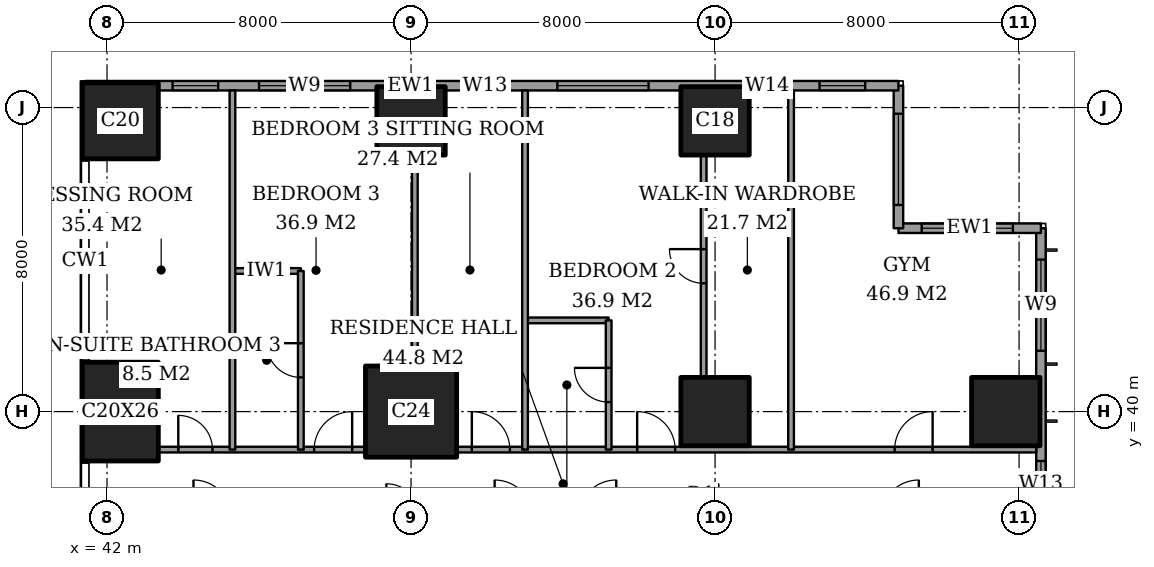
"""IFC4 building model, lengths in metres.
Left out: names, types, materials, properties, quantities, classifications, styles, units other than length and angle.
Written with IfcOpenShell. Run it as: python <this file> out.ifc"""

import sys

from ifc_helpers import new_model, si_unit, direction, frame, frame_2d, origin, origin_2d, place, context, subcontext, project, spatial, rectangle, extrude, element, fill, save


model = new_model("IFC4")
c1 = context("Model", 3, precision=1e-05, world=origin(), true_north=direction((0.0, 1.0)))
c2 = subcontext(c1, "Body", "Model", "MODEL_VIEW")
j1 = project(units=[si_unit("LENGTHUNIT", "METRE"), si_unit("PLANEANGLEUNIT", "RADIAN")], contexts=[c1])
p1 = place(None, origin())
s1 = spatial("IfcSite", under=j1, at=p1, CompositionType="ELEMENT")
p2 = place(p1, origin())
s2 = spatial("IfcBuilding", under=s1, at=p2, CompositionType="ELEMENT")
p3 = place(p2, frame((0.0, 0.0, 203.8)))
s3 = spatial("IfcBuildingStorey", under=s2, at=p3, CompositionType="ELEMENT", Elevation=203.8)
p4 = place(p3, frame((42.35, 40.0, 0.0), z_axis=(0.0, 0.0, 1.0), x_axis=(1.0, 0.0, 0.0)))
e1 = element("IfcColumn", 1, at=p4, inside=s3, PredefinedType="COLUMN", context=c2, shape_type="SweptSolid", body=[
    extrude(rectangle(XDim=2.0, YDim=2.6, at=origin_2d()), origin(), (0.0, 0.0, 1.0), 3.6),
])
p5 = place(p3, frame((42.35, 47.65, 0.0), z_axis=(0.0, 0.0, 1.0), x_axis=(1.0, 0.0, 0.0)))
e2 = element("IfcColumn", 2, at=p5, inside=s3, PredefinedType="COLUMN", context=c2, shape_type="SweptSolid", body=[
    extrude(rectangle(XDim=2.0, YDim=2.0, at=origin_2d()), origin(), (0.0, 0.0, 1.0), 3.6),
])
p6 = place(p3, frame((50.0, 40.0, 0.0), z_axis=(0.0, 0.0, 1.0), x_axis=(1.0, 0.0, 0.0)))
e3 = element("IfcColumn", 3, at=p6, inside=s3, PredefinedType="COLUMN", context=c2, shape_type="SweptSolid", body=[
    extrude(rectangle(XDim=2.4, YDim=2.4, at=origin_2d()), origin(), (0.0, 0.0, 1.0), 3.6),
])
for number, where, z_axis, x_axis in (
    (4, (50.0, 47.65, 0.0), (0.0, 0.0, 1.0), (1.0, 0.0, 0.0)),
    (5, (58.0, 40.0, 0.0), (0.0, 0.0, 1.0), (1.0, 0.0, 0.0)),
    (6, (58.0, 47.65, 0.0), (0.0, 0.0, 1.0), (1.0, 0.0, 0.0)),
    (7, (65.65, 40.0, 0.0), (0.0, 0.0, 1.0), (1.0, 0.0, 0.0)),
):
    element("IfcColumn", number, at=place(p3, frame(where, z_axis=z_axis, x_axis=x_axis)), inside=s3, PredefinedType="COLUMN", context=c2, shape_type="SweptSolid", body=[
        extrude(rectangle(XDim=1.8, YDim=1.8, at=origin_2d()), origin(), (0.0, 0.0, 1.0), 3.6),
    ])
p7 = place(p3, frame((66.575, 3.175, 0.0), z_axis=(0.0, 0.0, 1.0), x_axis=(0.0, 1.0, 0.0)))
e8 = element("IfcWall", 8, at=p7, inside=s3, PredefinedType="SOLIDWALL", context=c2, shape_type="SweptSolid", body=[
    extrude(rectangle(XDim=41.65, YDim=0.25, at=frame_2d((20.825, 0.0))), origin(), (0.0, 0.0, 1.0), 3.6),
])
p8 = place(p7, frame((0.825, 0.0, 0.2)))
e9 = element("IfcOpeningElement", 9, at=p8, cuts=e8, PredefinedType="OPENING", context=c2, shape_type="SweptSolid", body=[
    extrude(rectangle(XDim=2.4, YDim=2.4, at=frame_2d((1.2, 1.2))), frame((0.0, 0.135, 0.0), z_axis=(0.0, -1.0, 0.0), x_axis=(1.0, 0.0, 0.0)), (0.0, 0.0, 1.0), 0.27),
])
p9 = place(p7, frame((6.6, 0.0, 0.2)))
e10 = element("IfcOpeningElement", 10, at=p9, cuts=e8, PredefinedType="OPENING", context=c2, shape_type="SweptSolid", body=[
    extrude(rectangle(XDim=1.2, YDim=2.4, at=frame_2d((0.6, 1.2))), frame((0.0, 0.135, 0.0), z_axis=(0.0, -1.0, 0.0), x_axis=(1.0, 0.0, 0.0)), (0.0, 0.0, 1.0), 0.27),
])
p10 = place(p7, frame((8.775, 0.0, 0.2)))
e11 = element("IfcOpeningElement", 11, at=p10, cuts=e8, PredefinedType="OPENING", context=c2, shape_type="SweptSolid", body=[
    extrude(rectangle(XDim=2.4, YDim=2.4, at=frame_2d((1.2, 1.2))), frame((0.0, 0.135, 0.0), z_axis=(0.0, -1.0, 0.0), x_axis=(1.0, 0.0, 0.0)), (0.0, 0.0, 1.0), 0.27),
])
p11 = place(p7, frame((15.675, 0.0, 0.2)))
e12 = element("IfcOpeningElement", 12, at=p11, cuts=e8, PredefinedType="OPENING", context=c2, shape_type="SweptSolid", body=[
    extrude(rectangle(XDim=2.4, YDim=2.4, at=frame_2d((1.2, 1.2))), frame((0.0, 0.135, 0.0), z_axis=(0.0, -1.0, 0.0), x_axis=(1.0, 0.0, 0.0)), (0.0, 0.0, 1.0), 0.27),
])
p12 = place(p7, frame((23.575, 0.0, 0.2)))
e13 = element("IfcOpeningElement", 13, at=p12, cuts=e8, PredefinedType="OPENING", context=c2, shape_type="SweptSolid", body=[
    extrude(rectangle(XDim=2.4, YDim=2.4, at=frame_2d((1.2, 1.2))), frame((0.0, 0.135, 0.0), z_axis=(0.0, -1.0, 0.0), x_axis=(1.0, 0.0, 0.0)), (0.0, 0.0, 1.0), 0.27),
])
p13 = place(p7, frame((30.675, 0.0, 0.2)))
e14 = element("IfcOpeningElement", 14, at=p13, cuts=e8, PredefinedType="OPENING", context=c2, shape_type="SweptSolid", body=[
    extrude(rectangle(XDim=2.4, YDim=2.4, at=frame_2d((1.2, 1.2))), frame((0.0, 0.135, 0.0), z_axis=(0.0, -1.0, 0.0), x_axis=(1.0, 0.0, 0.0)), (0.0, 0.0, 1.0), 0.27),
])
p14 = place(p7, frame((34.325, 0.0, 0.2)))
e15 = element("IfcOpeningElement", 15, at=p14, cuts=e8, PredefinedType="OPENING", context=c2, shape_type="SweptSolid", body=[
    extrude(rectangle(XDim=1.2, YDim=2.4, at=frame_2d((0.6, 1.2))), frame((0.0, 0.135, 0.0), z_axis=(0.0, -1.0, 0.0), x_axis=(1.0, 0.0, 0.0)), (0.0, 0.0, 1.0), 0.27),
])
p15 = place(p7, frame((38.425, 0.0, 0.2)))
e16 = element("IfcOpeningElement", 16, at=p15, cuts=e8, PredefinedType="OPENING", context=c2, shape_type="SweptSolid", body=[
    extrude(rectangle(XDim=2.4, YDim=2.4, at=frame_2d((1.2, 1.2))), frame((0.0, 0.135, 0.0), z_axis=(0.0, -1.0, 0.0), x_axis=(1.0, 0.0, 0.0)), (0.0, 0.0, 1.0), 0.27),
])
p16 = place(p3, frame((66.575, 44.825, 0.0), z_axis=(0.0, 0.0, 1.0), x_axis=(-1.0, 0.0, 0.0)))
e17 = element("IfcWall", 17, at=p16, inside=s3, PredefinedType="SOLIDWALL", context=c2, shape_type="SweptSolid", body=[
    extrude(rectangle(XDim=3.75, YDim=0.25, at=frame_2d((1.875, 0.0))), origin(), (0.0, 0.0, 1.0), 3.6),
])
p17 = place(p16, frame((0.738, 0.0, 0.2)))
e18 = element("IfcOpeningElement", 18, at=p17, cuts=e17, PredefinedType="OPENING", context=c2, shape_type="SweptSolid", body=[
    extrude(rectangle(XDim=2.4, YDim=2.4, at=frame_2d((1.2, 1.2))), frame((0.0, 0.135, 0.0), z_axis=(0.0, -1.0, 0.0), x_axis=(1.0, 0.0, 0.0)), (0.0, 0.0, 1.0), 0.27),
])
p18 = place(p3, frame((62.825, 44.825, 0.0), z_axis=(0.0, 0.0, 1.0), x_axis=(0.0, 1.0, 0.0)))
e19 = element("IfcWall", 19, at=p18, inside=s3, PredefinedType="SOLIDWALL", context=c2, shape_type="SweptSolid", body=[
    extrude(rectangle(XDim=3.75, YDim=0.25, at=frame_2d((1.875, 0.0))), origin(), (0.0, 0.0, 1.0), 3.6),
])
p19 = place(p18, frame((0.613, 0.0, 0.2)))
e20 = element("IfcOpeningElement", 20, at=p19, cuts=e19, PredefinedType="OPENING", context=c2, shape_type="SweptSolid", body=[
    extrude(rectangle(XDim=2.4, YDim=2.4, at=frame_2d((1.2, 1.2))), frame((0.0, 0.135, 0.0), z_axis=(0.0, -1.0, 0.0), x_axis=(1.0, 0.0, 0.0)), (0.0, 0.0, 1.0), 0.27),
])
p20 = place(p3, frame((62.825, 48.575, 0.0), z_axis=(0.0, 0.0, 1.0), x_axis=(-1.0, 0.0, 0.0)))
e21 = element("IfcWall", 21, at=p20, inside=s3, PredefinedType="SOLIDWALL", context=c2, shape_type="SweptSolid", body=[
    extrude(rectangle(XDim=21.4, YDim=0.25, at=frame_2d((10.7, 0.0))), origin(), (0.0, 0.0, 1.0), 3.6),
])
p21 = place(p20, frame((0.875, 0.0, 0.2)))
e22 = element("IfcOpeningElement", 22, at=p21, cuts=e21, PredefinedType="OPENING", context=c2, shape_type="SweptSolid", body=[
    extrude(rectangle(XDim=1.2, YDim=2.4, at=frame_2d((0.6, 1.2))), frame((0.0, 0.135, 0.0), z_axis=(0.0, -1.0, 0.0), x_axis=(1.0, 0.0, 0.0)), (0.0, 0.0, 1.0), 0.27),
])
p22 = place(p20, frame((3.15, 0.0, 0.2)))
e23 = element("IfcOpeningElement", 23, at=p22, cuts=e21, PredefinedType="OPENING", context=c2, shape_type="SweptSolid", body=[
    extrude(rectangle(XDim=0.6, YDim=2.4, at=frame_2d((0.3, 1.2))), frame((0.0, 0.135, 0.0), z_axis=(0.0, -1.0, 0.0), x_axis=(1.0, 0.0, 0.0)), (0.0, 0.0, 1.0), 0.27),
])
p23 = place(p20, frame((6.575, 0.0, 0.2)))
e24 = element("IfcOpeningElement", 24, at=p23, cuts=e21, PredefinedType="OPENING", context=c2, shape_type="SweptSolid", body=[
    extrude(rectangle(XDim=2.4, YDim=2.4, at=frame_2d((1.2, 1.2))), frame((0.0, 0.135, 0.0), z_axis=(0.0, -1.0, 0.0), x_axis=(1.0, 0.0, 0.0)), (0.0, 0.0, 1.0), 0.27),
])
p24 = place(p20, frame((10.275, 0.0, 0.2)))
e25 = element("IfcOpeningElement", 25, at=p24, cuts=e21, PredefinedType="OPENING", context=c2, shape_type="SweptSolid", body=[
    extrude(rectangle(XDim=1.2, YDim=2.4, at=frame_2d((0.6, 1.2))), frame((0.0, 0.135, 0.0), z_axis=(0.0, -1.0, 0.0), x_axis=(1.0, 0.0, 0.0)), (0.0, 0.0, 1.0), 0.27),
])
p25 = place(p20, frame((14.425, 0.0, 0.2)))
e26 = element("IfcOpeningElement", 26, at=p25, cuts=e21, PredefinedType="OPENING", context=c2, shape_type="SweptSolid", body=[
    extrude(rectangle(XDim=2.4, YDim=2.4, at=frame_2d((1.2, 1.2))), frame((0.0, 0.135, 0.0), z_axis=(0.0, -1.0, 0.0), x_axis=(1.0, 0.0, 0.0)), (0.0, 0.0, 1.0), 0.27),
])
p26 = place(p20, frame((17.9, 0.0, 0.2)))
e27 = element("IfcOpeningElement", 27, at=p26, cuts=e21, PredefinedType="OPENING", context=c2, shape_type="SweptSolid", body=[
    extrude(rectangle(XDim=1.2, YDim=2.4, at=frame_2d((0.6, 1.2))), frame((0.0, 0.135, 0.0), z_axis=(0.0, -1.0, 0.0), x_axis=(1.0, 0.0, 0.0)), (0.0, 0.0, 1.0), 0.27),
])
p27 = place(p3, frame((43.35, 39.0, 0.0), z_axis=(0.0, 0.0, 1.0), x_axis=(1.0, 0.0, 0.0)))
e28 = element("IfcWall", 28, at=p27, inside=s3, PredefinedType="PARTITIONING", context=c2, shape_type="SweptSolid", body=[
    extrude(rectangle(XDim=5.45, YDim=0.15, at=frame_2d((2.725, 0.0))), origin(), (0.0, 0.0, 1.0), 3.35),
])
p28 = place(p27, frame((4.1, 0.0, 0.0)))
e29 = element("IfcOpeningElement", 29, at=p28, cuts=e28, PredefinedType="OPENING", context=c2, shape_type="SweptSolid", body=[
    extrude(rectangle(XDim=1.0, YDim=2.1, at=frame_2d((0.5, 1.05))), frame((0.0, 0.085, 0.0), z_axis=(0.0, -1.0, 0.0), x_axis=(1.0, 0.0, 0.0)), (0.0, 0.0, 1.0), 0.17),
])
p29 = place(p27, frame((0.525, 0.0, 0.0)))
e30 = element("IfcOpeningElement", 30, at=p29, cuts=e28, PredefinedType="OPENING", context=c2, shape_type="SweptSolid", body=[
    extrude(rectangle(XDim=0.9, YDim=2.1, at=frame_2d((0.45, 1.05))), frame((0.0, 0.085, 0.0), z_axis=(0.0, -1.0, 0.0), x_axis=(1.0, 0.0, 0.0)), (0.0, 0.0, 1.0), 0.17),
])
p30 = place(p3, frame((51.2, 39.0, 0.0), z_axis=(0.0, 0.0, 1.0), x_axis=(1.0, 0.0, 0.0)))
e31 = element("IfcWall", 31, at=p30, inside=s3, PredefinedType="PARTITIONING", context=c2, shape_type="SweptSolid", body=[
    extrude(rectangle(XDim=15.25, YDim=0.15, at=frame_2d((7.625, 0.0))), origin(), (0.0, 0.0, 1.0), 3.35),
])
p31 = place(p30, frame((11.525, 0.0, 0.0)))
e32 = element("IfcOpeningElement", 32, at=p31, cuts=e31, PredefinedType="OPENING", context=c2, shape_type="SweptSolid", body=[
    extrude(rectangle(XDim=1.0, YDim=2.1, at=frame_2d((0.5, 1.05))), frame((0.0, 0.085, 0.0), z_axis=(0.0, -1.0, 0.0), x_axis=(1.0, 0.0, 0.0)), (0.0, 0.0, 1.0), 0.17),
])
p32 = place(p30, frame((4.75, 0.0, 0.0)))
e33 = element("IfcOpeningElement", 33, at=p32, cuts=e31, PredefinedType="OPENING", context=c2, shape_type="SweptSolid", body=[
    extrude(rectangle(XDim=1.0, YDim=2.1, at=frame_2d((0.5, 1.05))), frame((0.0, 0.085, 0.0), z_axis=(0.0, -1.0, 0.0), x_axis=(1.0, 0.0, 0.0)), (0.0, 0.0, 1.0), 0.17),
])
p33 = place(p30, frame((0.4, 0.0, 0.0)))
e34 = element("IfcOpeningElement", 34, at=p33, cuts=e31, PredefinedType="OPENING", context=c2, shape_type="SweptSolid", body=[
    extrude(rectangle(XDim=1.0, YDim=2.1, at=frame_2d((0.5, 1.05))), frame((0.0, 0.085, 0.0), z_axis=(0.0, -1.0, 0.0), x_axis=(1.0, 0.0, 0.0)), (0.0, 0.0, 1.0), 0.17),
])
p34 = place(p3, frame((53.0, 42.4, 0.0), z_axis=(0.0, 0.0, 1.0), x_axis=(1.0, 0.0, 0.0)))
e35 = element("IfcWall", 35, at=p34, inside=s3, PredefinedType="PARTITIONING", context=c2, shape_type="SweptSolid", body=[
    extrude(rectangle(XDim=2.2, YDim=0.15, at=frame_2d((1.1, 0.0))), origin(), (0.0, 0.0, 1.0), 3.35),
])
p35 = place(p3, frame((45.3, 43.7, 0.0), z_axis=(0.0, 0.0, 1.0), x_axis=(1.0, 0.0, 0.0)))
e36 = element("IfcWall", 36, at=p35, inside=s3, PredefinedType="PARTITIONING", context=c2, shape_type="SweptSolid", body=[
    extrude(rectangle(XDim=1.8, YDim=0.15, at=frame_2d((0.9, 0.0))), origin(), (0.0, 0.0, 1.0), 3.35),
])
p36 = place(p3, frame((45.3, 39.0, 0.0), z_axis=(0.0, 0.0, 1.0), x_axis=(0.0, 1.0, 0.0)))
e37 = element("IfcWall", 37, at=p36, inside=s3, PredefinedType="PARTITIONING", context=c2, shape_type="SweptSolid", body=[
    extrude(rectangle(XDim=9.45, YDim=0.15, at=frame_2d((4.725, 0.0))), origin(), (0.0, 0.0, 1.0), 3.35),
])
p37 = place(p3, frame((47.1, 39.0, 0.0), z_axis=(0.0, 0.0, 1.0), x_axis=(0.0, 1.0, 0.0)))
e38 = element("IfcWall", 38, at=p37, inside=s3, PredefinedType="PARTITIONING", context=c2, shape_type="SweptSolid", body=[
    extrude(rectangle(XDim=4.7, YDim=0.15, at=frame_2d((2.35, 0.0))), origin(), (0.0, 0.0, 1.0), 3.35),
])
p38 = place(p37, frame((1.9, 0.0, 0.0)))
e39 = element("IfcOpeningElement", 39, at=p38, cuts=e38, PredefinedType="OPENING", context=c2, shape_type="SweptSolid", body=[
    extrude(rectangle(XDim=0.9, YDim=2.1, at=frame_2d((0.45, 1.05))), frame((0.0, 0.085, 0.0), z_axis=(0.0, -1.0, 0.0), x_axis=(1.0, 0.0, 0.0)), (0.0, 0.0, 1.0), 0.17),
])
p39 = place(p3, frame((50.1, 41.2, 0.0), z_axis=(0.0, 0.0, 1.0), x_axis=(0.0, 1.0, 0.0)))
e40 = element("IfcWall", 40, at=p39, inside=s3, PredefinedType="PARTITIONING", context=c2, shape_type="SweptSolid", body=[
    extrude(rectangle(XDim=5.55, YDim=0.15, at=frame_2d((2.775, 0.0))), origin(), (0.0, 0.0, 1.0), 3.35),
])
p40 = place(p3, frame((53.0, 39.0, 0.0), z_axis=(0.0, 0.0, 1.0), x_axis=(0.0, 1.0, 0.0)))
e41 = element("IfcWall", 41, at=p40, inside=s3, PredefinedType="PARTITIONING", context=c2, shape_type="SweptSolid", body=[
    extrude(rectangle(XDim=9.45, YDim=0.15, at=frame_2d((4.725, 0.0))), origin(), (0.0, 0.0, 1.0), 3.35),
])
p41 = place(p3, frame((55.2, 39.0, 0.0), z_axis=(0.0, 0.0, 1.0), x_axis=(0.0, 1.0, 0.0)))
e42 = element("IfcWall", 42, at=p41, inside=s3, PredefinedType="PARTITIONING", context=c2, shape_type="SweptSolid", body=[
    extrude(rectangle(XDim=3.4, YDim=0.15, at=frame_2d((1.7, 0.0))), origin(), (0.0, 0.0, 1.0), 3.35),
])
p42 = place(p41, frame((1.25, 0.0, 0.0)))
e43 = element("IfcOpeningElement", 43, at=p42, cuts=e42, PredefinedType="OPENING", context=c2, shape_type="SweptSolid", body=[
    extrude(rectangle(XDim=0.9, YDim=2.1, at=frame_2d((0.45, 1.05))), frame((0.0, 0.085, 0.0), z_axis=(0.0, -1.0, 0.0), x_axis=(1.0, 0.0, 0.0)), (0.0, 0.0, 1.0), 0.17),
])
p43 = place(p3, frame((57.7, 40.9, 0.0), z_axis=(0.0, 0.0, 1.0), x_axis=(0.0, 1.0, 0.0)))
e44 = element("IfcWall", 44, at=p43, inside=s3, PredefinedType="PARTITIONING", context=c2, shape_type="SweptSolid", body=[
    extrude(rectangle(XDim=5.85, YDim=0.15, at=frame_2d((2.925, 0.0))), origin(), (0.0, 0.0, 1.0), 3.35),
])
p44 = place(p43, frame((2.475, 0.0, 0.0)))
e45 = element("IfcOpeningElement", 45, at=p44, cuts=e44, PredefinedType="OPENING", context=c2, shape_type="SweptSolid", body=[
    extrude(rectangle(XDim=0.9, YDim=2.1, at=frame_2d((0.45, 1.05))), frame((0.0, 0.085, 0.0), z_axis=(0.0, -1.0, 0.0), x_axis=(1.0, 0.0, 0.0)), (0.0, 0.0, 1.0), 0.17),
])
p45 = place(p3, frame((60.0, 39.0, 0.0), z_axis=(0.0, 0.0, 1.0), x_axis=(0.0, 1.0, 0.0)))
e46 = element("IfcWall", 46, at=p45, inside=s3, PredefinedType="PARTITIONING", context=c2, shape_type="SweptSolid", body=[
    extrude(rectangle(XDim=9.45, YDim=0.15, at=frame_2d((4.725, 0.0))), origin(), (0.0, 0.0, 1.0), 3.35),
])
p46 = place(p14, origin())
e47 = element("IfcWindow", 47, at=p46, inside=s3, PartitioningType="SINGLE_PANEL", PredefinedType="WINDOW", context=c2, shape_type="SweptSolid", body=[
    extrude(rectangle(XDim=1.2, YDim=2.4, at=frame_2d((0.6, 1.2))), frame((0.0, 0.03, 0.0), z_axis=(0.0, -1.0, 0.0), x_axis=(1.0, 0.0, 0.0)), (0.0, 0.0, 1.0), 0.06),
])
fill(e15, e47)
p47 = place(p15, origin())
e48 = element("IfcWindow", 48, at=p47, inside=s3, PartitioningType="SINGLE_PANEL", PredefinedType="WINDOW", context=c2, shape_type="SweptSolid", body=[
    extrude(rectangle(XDim=2.4, YDim=2.4, at=frame_2d((1.2, 1.2))), frame((0.0, 0.03, 0.0), z_axis=(0.0, -1.0, 0.0), x_axis=(1.0, 0.0, 0.0)), (0.0, 0.0, 1.0), 0.06),
])
fill(e16, e48)
p48 = place(p17, origin())
e49 = element("IfcWindow", 49, at=p48, inside=s3, PartitioningType="SINGLE_PANEL", PredefinedType="WINDOW", context=c2, shape_type="SweptSolid", body=[
    extrude(rectangle(XDim=2.4, YDim=2.4, at=frame_2d((1.2, 1.2))), frame((0.0, 0.03, 0.0), z_axis=(0.0, -1.0, 0.0), x_axis=(1.0, 0.0, 0.0)), (0.0, 0.0, 1.0), 0.06),
])
fill(e18, e49)
p49 = place(p19, origin())
e50 = element("IfcWindow", 50, at=p49, inside=s3, PartitioningType="SINGLE_PANEL", PredefinedType="WINDOW", context=c2, shape_type="SweptSolid", body=[
    extrude(rectangle(XDim=2.4, YDim=2.4, at=frame_2d((1.2, 1.2))), frame((0.0, 0.03, 0.0), z_axis=(0.0, -1.0, 0.0), x_axis=(1.0, 0.0, 0.0)), (0.0, 0.0, 1.0), 0.06),
])
fill(e20, e50)
p50 = place(p21, origin())
e51 = element("IfcWindow", 51, at=p50, inside=s3, PartitioningType="SINGLE_PANEL", PredefinedType="WINDOW", context=c2, shape_type="SweptSolid", body=[
    extrude(rectangle(XDim=1.2, YDim=2.4, at=frame_2d((0.6, 1.2))), frame((0.0, 0.03, 0.0), z_axis=(0.0, -1.0, 0.0), x_axis=(1.0, 0.0, 0.0)), (0.0, 0.0, 1.0), 0.06),
])
fill(e22, e51)
p51 = place(p22, origin())
e52 = element("IfcWindow", 52, at=p51, inside=s3, PartitioningType="SINGLE_PANEL", PredefinedType="WINDOW", context=c2, shape_type="SweptSolid", body=[
    extrude(rectangle(XDim=0.6, YDim=2.4, at=frame_2d((0.3, 1.2))), frame((0.0, 0.03, 0.0), z_axis=(0.0, -1.0, 0.0), x_axis=(1.0, 0.0, 0.0)), (0.0, 0.0, 1.0), 0.06),
])
fill(e23, e52)
p52 = place(p23, origin())
e53 = element("IfcWindow", 53, at=p52, inside=s3, PartitioningType="SINGLE_PANEL", PredefinedType="WINDOW", context=c2, shape_type="SweptSolid", body=[
    extrude(rectangle(XDim=2.4, YDim=2.4, at=frame_2d((1.2, 1.2))), frame((0.0, 0.03, 0.0), z_axis=(0.0, -1.0, 0.0), x_axis=(1.0, 0.0, 0.0)), (0.0, 0.0, 1.0), 0.06),
])
fill(e24, e53)
p53 = place(p24, origin())
e54 = element("IfcWindow", 54, at=p53, inside=s3, PartitioningType="SINGLE_PANEL", PredefinedType="WINDOW", context=c2, shape_type="SweptSolid", body=[
    extrude(rectangle(XDim=1.2, YDim=2.4, at=frame_2d((0.6, 1.2))), frame((0.0, 0.03, 0.0), z_axis=(0.0, -1.0, 0.0), x_axis=(1.0, 0.0, 0.0)), (0.0, 0.0, 1.0), 0.06),
])
fill(e25, e54)
p54 = place(p25, origin())
e55 = element("IfcWindow", 55, at=p54, inside=s3, PartitioningType="SINGLE_PANEL", PredefinedType="WINDOW", context=c2, shape_type="SweptSolid", body=[
    extrude(rectangle(XDim=2.4, YDim=2.4, at=frame_2d((1.2, 1.2))), frame((0.0, 0.03, 0.0), z_axis=(0.0, -1.0, 0.0), x_axis=(1.0, 0.0, 0.0)), (0.0, 0.0, 1.0), 0.06),
])
fill(e26, e55)
p55 = place(p26, origin())
e56 = element("IfcWindow", 56, at=p55, inside=s3, PartitioningType="SINGLE_PANEL", PredefinedType="WINDOW", context=c2, shape_type="SweptSolid", body=[
    extrude(rectangle(XDim=1.2, YDim=2.4, at=frame_2d((0.6, 1.2))), frame((0.0, 0.03, 0.0), z_axis=(0.0, -1.0, 0.0), x_axis=(1.0, 0.0, 0.0)), (0.0, 0.0, 1.0), 0.06),
])
fill(e27, e56)
p56 = place(p31, origin())
e57 = element("IfcDoor", 57, at=p56, inside=s3, OperationType="SINGLE_SWING_LEFT", PredefinedType="DOOR", context=c2, shape_type="SweptSolid", body=[
    extrude(rectangle(XDim=1.0, YDim=2.1, at=frame_2d((0.5, 1.05))), frame((0.0, 0.025, 0.0), z_axis=(0.0, -1.0, 0.0), x_axis=(1.0, 0.0, 0.0)), (0.0, 0.0, 1.0), 0.05),
])
fill(e32, e57)
p57 = place(p44, origin())
e58 = element("IfcDoor", 58, at=p57, inside=s3, OperationType="SINGLE_SWING_LEFT", PredefinedType="DOOR", context=c2, shape_type="SweptSolid", body=[
    extrude(rectangle(XDim=0.9, YDim=2.1, at=frame_2d((0.45, 1.05))), frame((0.0, 0.025, 0.0), z_axis=(0.0, -1.0, 0.0), x_axis=(1.0, 0.0, 0.0)), (0.0, 0.0, 1.0), 0.05),
])
fill(e45, e58)
p58 = place(p42, origin())
e59 = element("IfcDoor", 59, at=p58, inside=s3, OperationType="SINGLE_SWING_LEFT", PredefinedType="DOOR", context=c2, shape_type="SweptSolid", body=[
    extrude(rectangle(XDim=0.9, YDim=2.1, at=frame_2d((0.45, 1.05))), frame((0.0, 0.025, 0.0), z_axis=(0.0, -1.0, 0.0), x_axis=(1.0, 0.0, 0.0)), (0.0, 0.0, 1.0), 0.05),
])
fill(e43, e59)
p59 = place(p32, origin())
e60 = element("IfcDoor", 60, at=p59, inside=s3, OperationType="SINGLE_SWING_RIGHT", PredefinedType="DOOR", context=c2, shape_type="SweptSolid", body=[
    extrude(rectangle(XDim=1.0, YDim=2.1, at=frame_2d((0.5, 1.05))), frame((0.0, 0.025, 0.0), z_axis=(0.0, -1.0, 0.0), x_axis=(1.0, 0.0, 0.0)), (0.0, 0.0, 1.0), 0.05),
])
fill(e33, e60)
p60 = place(p33, origin())
e61 = element("IfcDoor", 61, at=p60, inside=s3, OperationType="SINGLE_SWING_RIGHT", PredefinedType="DOOR", context=c2, shape_type="SweptSolid", body=[
    extrude(rectangle(XDim=1.0, YDim=2.1, at=frame_2d((0.5, 1.05))), frame((0.0, 0.025, 0.0), z_axis=(0.0, -1.0, 0.0), x_axis=(1.0, 0.0, 0.0)), (0.0, 0.0, 1.0), 0.05),
])
fill(e34, e61)
p61 = place(p38, origin())
e62 = element("IfcDoor", 62, at=p61, inside=s3, OperationType="SINGLE_SWING_LEFT", PredefinedType="DOOR", context=c2, shape_type="SweptSolid", body=[
    extrude(rectangle(XDim=0.9, YDim=2.1, at=frame_2d((0.45, 1.05))), frame((0.0, 0.025, 0.0), z_axis=(0.0, -1.0, 0.0), x_axis=(1.0, 0.0, 0.0)), (0.0, 0.0, 1.0), 0.05),
])
fill(e39, e62)
p62 = place(p28, origin())
e63 = element("IfcDoor", 63, at=p62, inside=s3, OperationType="SINGLE_SWING_LEFT", PredefinedType="DOOR", context=c2, shape_type="SweptSolid", body=[
    extrude(rectangle(XDim=1.0, YDim=2.1, at=frame_2d((0.5, 1.05))), frame((0.0, 0.025, 0.0), z_axis=(0.0, -1.0, 0.0), x_axis=(1.0, 0.0, 0.0)), (0.0, 0.0, 1.0), 0.05),
])
fill(e29, e63)
p63 = place(p29, origin())
e64 = element("IfcDoor", 64, at=p63, inside=s3, OperationType="SINGLE_SWING_RIGHT", PredefinedType="DOOR", context=c2, shape_type="SweptSolid", body=[
    extrude(rectangle(XDim=0.9, YDim=2.1, at=frame_2d((0.45, 1.05))), frame((0.0, 0.025, 0.0), z_axis=(0.0, -1.0, 0.0), x_axis=(1.0, 0.0, 0.0)), (0.0, 0.0, 1.0), 0.05),
])
fill(e30, e64)
save(model, sys.argv[1])
